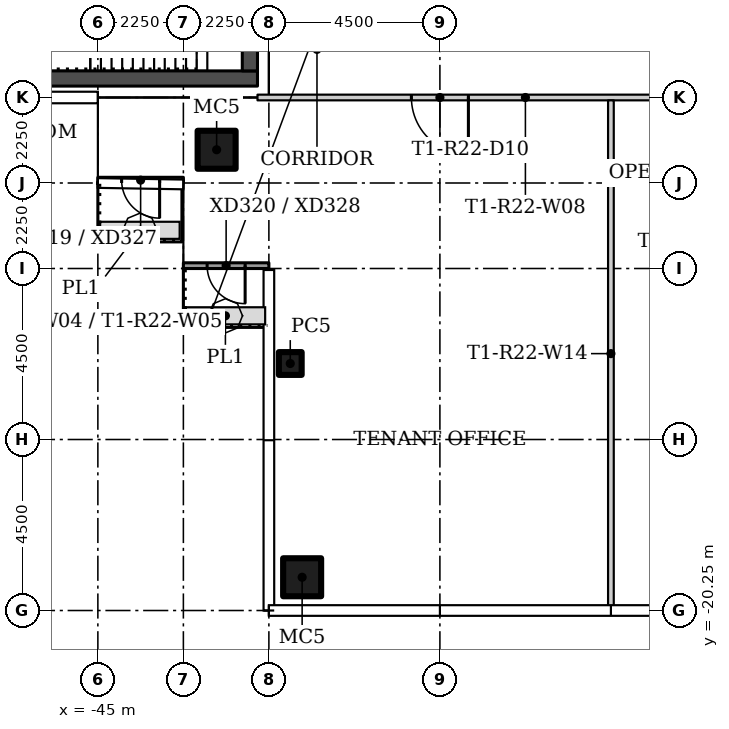
"""IFC4 building model, lengths in metres.
Left out: names, types, materials, properties, quantities, classifications, styles, units other than length and angle.
Written with IfcOpenShell. Run it as: python <this file> out.ifc"""

import sys

from ifc_helpers import new_model, si_unit, direction, frame, frame_2d, origin, origin_2d, place, context, subcontext, project, spatial, rectangle, hollow_rectangle, extrude, element, fill, save


model = new_model("IFC4")
c1 = context("Model", 3, precision=1e-05, world=origin(), true_north=direction((0.0, 1.0)))
c2 = subcontext(c1, "Body", "Model", "MODEL_VIEW")
j1 = project(units=[si_unit("LENGTHUNIT", "METRE"), si_unit("PLANEANGLEUNIT", "RADIAN")], contexts=[c1])
p1 = place(None, origin())
s1 = spatial("IfcSite", under=j1, at=p1, CompositionType="ELEMENT")
p2 = place(p1, origin())
s2 = spatial("IfcBuilding", under=s1, at=p2, CompositionType="ELEMENT")
p3 = place(p2, frame((0.0, 0.0, 202.2)))
s3 = spatial("IfcBuildingStorey", under=s2, at=p3, CompositionType="ELEMENT", Elevation=202.2)
p4 = place(p3, frame((-41.875, -8.125, 0.0)))
e1 = element("IfcColumn", 1, at=p4, inside=s3, PredefinedType="COLUMN", context=c2, shape_type="SweptSolid", body=[
    extrude(hollow_rectangle(XDim=1.0, YDim=1.0, WallThickness=0.04, at=origin_2d()), origin(), (0.0, 0.0, 1.0), 3.55),
])
p5 = place(p3, frame((-39.938, -13.75, 0.0)))
e2 = element("IfcColumn", 2, at=p5, inside=s3, PredefinedType="COLUMN", context=c2, shape_type="SweptSolid", body=[
    extrude(hollow_rectangle(XDim=0.6, YDim=0.6, WallThickness=0.02, at=origin_2d()), origin(), (0.0, 0.0, 1.0), 3.55),
])
p6 = place(p3, frame((-39.625, -19.375, 0.0)))
e3 = element("IfcColumn", 3, at=p6, inside=s3, PredefinedType="COLUMN", context=c2, shape_type="SweptSolid", body=[
    extrude(hollow_rectangle(XDim=1.0, YDim=1.0, WallThickness=0.04, at=origin_2d()), origin(), (0.0, 0.0, 1.0), 3.55),
])
p7 = place(p3, frame((-26.7, -6.75, 0.0), z_axis=(0.0, 0.0, 1.0), x_axis=(-1.0, 0.0, 0.0)))
e4 = element("IfcWall", 4, at=p7, inside=s3, PredefinedType="PARTITIONING", context=c2, shape_type="SweptSolid", body=[
    extrude(rectangle(XDim=14.1, YDim=0.15, at=frame_2d((7.05, 0.0))), origin(), (0.0, 0.0, 1.0), 3.55),
])
p8 = place(p7, frame((1.8, 0.0, 0.0)))
e5 = element("IfcOpeningElement", 5, at=p8, cuts=e4, PredefinedType="OPENING", context=c2, shape_type="SweptSolid", body=[
    extrude(rectangle(XDim=1.5, YDim=2.1, at=frame_2d((0.75, 1.05))), frame((0.0, 0.085, 0.0), z_axis=(0.0, -1.0, 0.0), x_axis=(1.0, 0.0, 0.0)), (0.0, 0.0, 1.0), 0.17),
])
p9 = place(p7, frame((8.55, 0.0, 0.0)))
e6 = element("IfcOpeningElement", 6, at=p9, cuts=e4, PredefinedType="OPENING", context=c2, shape_type="SweptSolid", body=[
    extrude(rectangle(XDim=1.5, YDim=2.1, at=frame_2d((0.75, 1.05))), frame((0.0, 0.085, 0.0), z_axis=(0.0, -1.0, 0.0), x_axis=(1.0, 0.0, 0.0)), (0.0, 0.0, 1.0), 0.17),
])
p10 = place(p3, frame((-31.5, -20.155, 0.0), z_axis=(0.0, 0.0, 1.0), x_axis=(0.0, 1.0, 0.0)))
e7 = element("IfcWall", 7, at=p10, inside=s3, PredefinedType="PARTITIONING", context=c2, shape_type="SweptSolid", body=[
    extrude(rectangle(XDim=13.33, YDim=0.15, at=frame_2d((6.665, 0.0))), origin(), (0.0, 0.0, 1.0), 3.55),
])
p11 = place(p3, frame((-42.75, -8.925, 0.0), z_axis=(0.0, 0.0, 1.0), x_axis=(-1.0, 0.0, 0.0)))
e8 = element("IfcWall", 8, at=p11, inside=s3, PredefinedType="SOLIDWALL", context=c2, shape_type="SweptSolid", body=[
    extrude(rectangle(XDim=2.25, YDim=0.15, at=frame_2d((1.125, 0.0))), origin(), (0.0, 0.0, 1.0), 3.45),
])
p12 = place(p11, frame((0.625, 0.0, 0.0)))
e9 = element("IfcOpeningElement", 9, at=p12, cuts=e8, PredefinedType="OPENING", context=c2, shape_type="SweptSolid", body=[
    extrude(rectangle(XDim=1.0, YDim=2.4, at=frame_2d((0.5, 1.2))), frame((0.0, 0.085, 0.0), z_axis=(0.0, -1.0, 0.0), x_axis=(1.0, 0.0, 0.0)), (0.0, 0.0, 1.0), 0.17),
])
p13 = place(p3, frame((-40.5, -11.175, 0.0), z_axis=(0.0, 0.0, 1.0), x_axis=(-1.0, 0.0, 0.0)))
e10 = element("IfcWall", 10, at=p13, inside=s3, PredefinedType="SOLIDWALL", context=c2, shape_type="SweptSolid", body=[
    extrude(rectangle(XDim=2.25, YDim=0.15, at=frame_2d((1.125, 0.0))), origin(), (0.0, 0.0, 1.0), 3.45),
])
p14 = place(p13, frame((0.625, 0.0, 0.0)))
e11 = element("IfcOpeningElement", 11, at=p14, cuts=e10, PredefinedType="OPENING", context=c2, shape_type="SweptSolid", body=[
    extrude(rectangle(XDim=1.0, YDim=2.4, at=frame_2d((0.5, 1.2))), frame((0.0, 0.085, 0.0), z_axis=(0.0, -1.0, 0.0), x_axis=(1.0, 0.0, 0.0)), (0.0, 0.0, 1.0), 0.17),
])
p15 = place(p3, frame((-40.8, -6.25, 0.0), z_axis=(0.0, 0.0, 1.0), x_axis=(-1.0, 0.0, 0.0)))
e12 = element("IfcWall", 12, at=p15, inside=s3, PredefinedType="SHEAR", context=c2, shape_type="SweptSolid", body=[
    extrude(rectangle(XDim=12.9, YDim=0.4, at=frame_2d((6.45, 0.0))), origin(), (0.0, 0.0, 1.0), 3.55),
])
p16 = place(p3, frame((-41.0, -6.05, 0.0), z_axis=(0.0, 0.0, 1.0), x_axis=(0.0, 1.0, 0.0)))
e13 = element("IfcWall", 13, at=p16, inside=s3, PredefinedType="SHEAR", context=c2, shape_type="SweptSolid", body=[
    extrude(rectangle(XDim=12.1, YDim=0.4, at=frame_2d((6.05, 0.0))), origin(), (0.0, 0.0, 1.0), 3.55),
])
p17 = place(p16, frame((6.4, 0.0, 0.0)))
e14 = element("IfcOpeningElement", 14, at=p17, cuts=e13, PredefinedType="OPENING", context=c2, shape_type="SweptSolid", body=[
    extrude(rectangle(XDim=1.8, YDim=2.4, at=frame_2d((0.9, 1.2))), frame((0.0, 0.21, 0.0), z_axis=(0.0, -1.0, 0.0), x_axis=(1.0, 0.0, 0.0)), (0.0, 0.0, 1.0), 0.42),
])
p18 = place(p9, origin())
e15 = element("IfcDoor", 15, at=p18, inside=s3, OperationType="DOUBLE_DOOR_SINGLE_SWING", PredefinedType="DOOR", context=c2, shape_type="SweptSolid", body=[
    extrude(rectangle(XDim=1.5, YDim=2.1, at=frame_2d((0.75, 1.05))), frame((0.0, 0.025, 0.0), z_axis=(0.0, -1.0, 0.0), x_axis=(1.0, 0.0, 0.0)), (0.0, 0.0, 1.0), 0.05),
])
fill(e6, e15)
p19 = place(p12, origin())
e16 = element("IfcDoor", 16, at=p19, inside=s3, OperationType="SINGLE_SWING_LEFT", PredefinedType="DOOR", context=c2, shape_type="SweptSolid", body=[
    extrude(rectangle(XDim=1.0, YDim=2.4, at=frame_2d((0.5, 1.2))), frame((0.0, 0.025, 0.0), z_axis=(0.0, -1.0, 0.0), x_axis=(1.0, 0.0, 0.0)), (0.0, 0.0, 1.0), 0.05),
])
fill(e9, e16)
p20 = place(p14, origin())
e17 = element("IfcDoor", 17, at=p20, inside=s3, OperationType="SINGLE_SWING_RIGHT", PredefinedType="DOOR", context=c2, shape_type="SweptSolid", body=[
    extrude(rectangle(XDim=1.0, YDim=2.4, at=frame_2d((0.5, 1.2))), frame((0.0, 0.025, 0.0), z_axis=(0.0, -1.0, 0.0), x_axis=(1.0, 0.0, 0.0)), (0.0, 0.0, 1.0), 0.05),
])
fill(e11, e17)
save(model, sys.argv[1])
